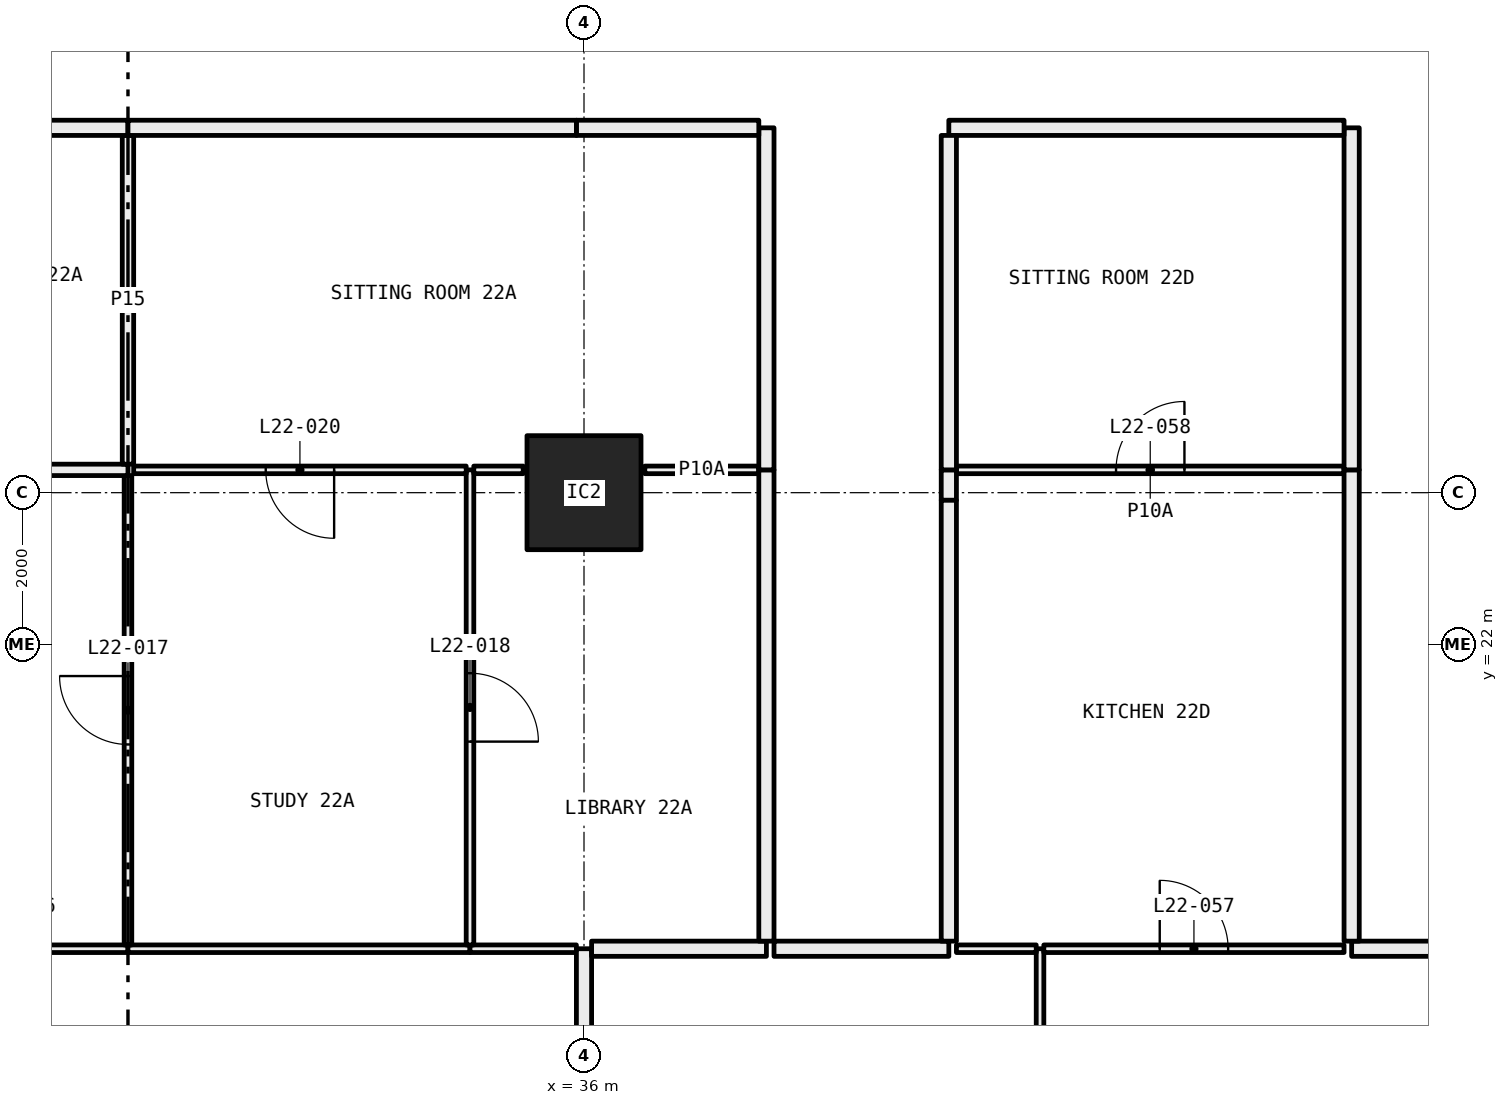
"""IFC4 building model, lengths in metres.
Left out: names, types, materials, properties, quantities, classifications, styles, units other than length and angle.
Written with IfcOpenShell. Run it as: python <this file> out.ifc"""

import sys

from ifc_helpers import new_model, si_unit, direction, frame, frame_2d, origin, origin_2d, place, context, subcontext, project, spatial, rectangle, hollow_rectangle, extrude, element, fill, save


model = new_model("IFC4")
c1 = context("Model", 3, precision=1e-05, world=origin(), true_north=direction((0.0, 1.0)))
c2 = subcontext(c1, "Body", "Model", "MODEL_VIEW")
j1 = project(units=[si_unit("LENGTHUNIT", "METRE"), si_unit("PLANEANGLEUNIT", "RADIAN")], contexts=[c1])
p1 = place(None, origin())
s1 = spatial("IfcSite", under=j1, at=p1, CompositionType="ELEMENT")
p2 = place(p1, origin())
s2 = spatial("IfcBuilding", under=s1, at=p2, CompositionType="ELEMENT")
p3 = place(p2, frame((0.0, 0.0, 88.65)))
s3 = spatial("IfcBuildingStorey", under=s2, at=p3, CompositionType="ELEMENT", Elevation=88.65)
p4 = place(p3, frame((36.0, 24.0, 0.0), z_axis=(0.0, 0.0, 1.0), x_axis=(1.0, 0.0, 0.0)))
e1 = element("IfcColumn", 1, at=p4, inside=s3, PredefinedType="COLUMN", context=c2, shape_type="SweptSolid", body=[
    extrude(hollow_rectangle(XDim=1.5, YDim=1.5, WallThickness=0.065, at=origin_2d()), origin(), (0.0, 0.0, 1.0), 3.05),
])
p5 = place(p3, frame((30.0, 18.0, 0.0), z_axis=(0.0, 0.0, 1.0), x_axis=(-1.0, 0.0, 0.0)))
e2 = element("IfcWall", 2, at=p5, inside=s3, PredefinedType="PARTITIONING", context=c2, shape_type="SweptSolid", body=[
    extrude(rectangle(XDim=2.95, YDim=0.1, at=frame_2d((1.475, 0.0))), origin(), (0.0, 0.0, 1.0), 3.05),
])
p6 = place(p5, frame((1.025, 0.0, 0.0)))
e3 = element("IfcOpeningElement", 3, at=p6, cuts=e2, PredefinedType="OPENING", context=c2, shape_type="SweptSolid", body=[
    extrude(rectangle(XDim=0.9, YDim=2.1, at=frame_2d((0.45, 1.05))), frame((0.0, 0.06, 0.0), z_axis=(0.0, -1.0, 0.0), x_axis=(1.0, 0.0, 0.0)), (0.0, 0.0, 1.0), 0.12),
])
p7 = place(p3, frame((34.5, 18.0, 0.0), z_axis=(0.0, 0.0, 1.0), x_axis=(-1.0, 0.0, 0.0)))
e4 = element("IfcWall", 4, at=p7, inside=s3, PredefinedType="PARTITIONING", context=c2, shape_type="SweptSolid", body=[
    extrude(rectangle(XDim=4.5, YDim=0.1, at=frame_2d((2.25, 0.0))), origin(), (0.0, 0.0, 1.0), 3.05),
])
p8 = place(p3, frame((35.9, 18.0, 0.0), z_axis=(0.0, 0.0, 1.0), x_axis=(-1.0, 0.0, 0.0)))
e5 = element("IfcWall", 5, at=p8, inside=s3, PredefinedType="PARTITIONING", context=c2, shape_type="SweptSolid", body=[
    extrude(rectangle(XDim=1.4, YDim=0.1, at=frame_2d((0.7, 0.0))), origin(), (0.0, 0.0, 1.0), 3.05),
])
p9 = place(p3, frame((36.0, 12.8, 0.0), z_axis=(0.0, 0.0, 1.0), x_axis=(0.0, 1.0, 0.0)))
e6 = element("IfcWall", 6, at=p9, inside=s3, PredefinedType="PARTITIONING", context=c2, shape_type="SweptSolid", body=[
    extrude(rectangle(XDim=5.2, YDim=0.2, at=frame_2d((2.6, 0.0))), origin(), (0.0, 0.0, 1.0), 2.45),
])
p10 = place(p3, frame((30.0, 18.05, 0.0), z_axis=(0.0, 0.0, 1.0), x_axis=(0.0, 1.0, 0.0)))
e7 = element("IfcWall", 7, at=p10, inside=s3, PredefinedType="PARTITIONING", context=c2, shape_type="SweptSolid", body=[
    extrude(rectangle(XDim=6.175, YDim=0.1, at=frame_2d((3.087, 0.0))), origin(), (0.0, 0.0, 1.0), 2.45),
])
p11 = place(p10, frame((2.637, 0.0, 0.0)))
e8 = element("IfcOpeningElement", 8, at=p11, cuts=e7, PredefinedType="OPENING", context=c2, shape_type="SweptSolid", body=[
    extrude(rectangle(XDim=0.9, YDim=2.1, at=frame_2d((0.45, 1.05))), frame((0.0, 0.06, 0.0), z_axis=(0.0, -1.0, 0.0), x_axis=(1.0, 0.0, 0.0)), (0.0, 0.0, 1.0), 0.12),
])
p12 = place(p3, frame((30.0, 24.3, 0.0), z_axis=(0.0, 0.0, 1.0), x_axis=(-1.0, 0.0, 0.0)))
e9 = element("IfcWall", 9, at=p12, inside=s3, PredefinedType="PARTITIONING", context=c2, shape_type="SweptSolid", body=[
    extrude(rectangle(XDim=4.0, YDim=0.15, at=frame_2d((2.0, 0.0))), origin(), (0.0, 0.0, 1.0), 3.05),
])
p13 = place(p12, frame((1.55, 0.0, 0.0)))
e10 = element("IfcOpeningElement", 10, at=p13, cuts=e9, PredefinedType="OPENING", context=c2, shape_type="SweptSolid", body=[
    extrude(rectangle(XDim=0.9, YDim=2.1, at=frame_2d((0.45, 1.05))), frame((0.0, 0.085, 0.0), z_axis=(0.0, -1.0, 0.0), x_axis=(1.0, 0.0, 0.0)), (0.0, 0.0, 1.0), 0.17),
])
p14 = place(p3, frame((34.5, 18.05, 0.0), z_axis=(0.0, 0.0, 1.0), x_axis=(0.0, 1.0, 0.0)))
e11 = element("IfcWall", 11, at=p14, inside=s3, PredefinedType="PARTITIONING", context=c2, shape_type="SweptSolid", body=[
    extrude(rectangle(XDim=6.25, YDim=0.1, at=frame_2d((3.125, 0.0))), origin(), (0.0, 0.0, 1.0), 2.45),
])
p15 = place(p14, frame((2.675, 0.0, 0.0)))
e12 = element("IfcOpeningElement", 12, at=p15, cuts=e11, PredefinedType="OPENING", context=c2, shape_type="SweptSolid", body=[
    extrude(rectangle(XDim=0.9, YDim=2.1, at=frame_2d((0.45, 1.05))), frame((0.0, 0.06, 0.0), z_axis=(0.0, -1.0, 0.0), x_axis=(1.0, 0.0, 0.0)), (0.0, 0.0, 1.0), 0.12),
])
p16 = place(p3, frame((34.45, 24.3, 0.0), z_axis=(0.0, 0.0, 1.0), x_axis=(-1.0, 0.0, 0.0)))
e13 = element("IfcWall", 13, at=p16, inside=s3, PredefinedType="PARTITIONING", context=c2, shape_type="SweptSolid", body=[
    extrude(rectangle(XDim=4.375, YDim=0.1, at=frame_2d((2.188, 0.0))), origin(), (0.0, 0.0, 1.0), 3.05),
])
p17 = place(p16, frame((1.738, 0.0, 0.0)))
e14 = element("IfcOpeningElement", 14, at=p17, cuts=e13, PredefinedType="OPENING", context=c2, shape_type="SweptSolid", body=[
    extrude(rectangle(XDim=0.9, YDim=2.1, at=frame_2d((0.45, 1.05))), frame((0.0, 0.06, 0.0), z_axis=(0.0, -1.0, 0.0), x_axis=(1.0, 0.0, 0.0)), (0.0, 0.0, 1.0), 0.12),
])
p18 = place(p3, frame((35.2, 24.3, 0.0), z_axis=(0.0, 0.0, 1.0), x_axis=(-1.0, 0.0, 0.0)))
e15 = element("IfcWall", 15, at=p18, inside=s3, PredefinedType="PARTITIONING", context=c2, shape_type="SweptSolid", body=[
    extrude(rectangle(XDim=0.65, YDim=0.1, at=frame_2d((0.325, 0.0))), origin(), (0.0, 0.0, 1.0), 3.05),
])
p19 = place(p3, frame((38.3, 24.3, 0.0), z_axis=(0.0, 0.0, 1.0), x_axis=(-1.0, 0.0, 0.0)))
e16 = element("IfcWall", 16, at=p19, inside=s3, PredefinedType="PARTITIONING", context=c2, shape_type="SweptSolid", body=[
    extrude(rectangle(XDim=1.5, YDim=0.1, at=frame_2d((0.75, 0.0))), origin(), (0.0, 0.0, 1.0), 3.05),
])
p20 = place(p3, frame((36.1, 18.0, 0.0), z_axis=(0.0, 0.0, 1.0), x_axis=(1.0, 0.0, 0.0)))
e17 = element("IfcWall", 17, at=p20, inside=s3, PredefinedType="PARTITIONING", context=c2, shape_type="SweptSolid", body=[
    extrude(rectangle(XDim=2.3, YDim=0.2, at=frame_2d((1.15, 0.0))), origin(), (0.0, 0.0, 1.0), 3.05),
])
p21 = place(p3, frame((38.4, 18.1, 0.0), z_axis=(0.0, 0.0, 1.0), x_axis=(0.0, 1.0, 0.0)))
e18 = element("IfcWall", 18, at=p21, inside=s3, PredefinedType="PARTITIONING", context=c2, shape_type="SweptSolid", body=[
    extrude(rectangle(XDim=6.2, YDim=0.2, at=frame_2d((3.1, 0.0))), origin(), (0.0, 0.0, 1.0), 2.45),
])
p22 = place(p3, frame((30.0, 24.375, 0.0), z_axis=(0.0, 0.0, 1.0), x_axis=(0.0, 1.0, 0.0)))
e19 = element("IfcWall", 19, at=p22, inside=s3, PredefinedType="PARTITIONING", context=c2, shape_type="SweptSolid", body=[
    extrude(rectangle(XDim=4.325, YDim=0.15, at=frame_2d((2.163, 0.0))), origin(), (0.0, 0.0, 1.0), 3.05),
])
p23 = place(p3, frame((30.0, 28.8, 0.0), z_axis=(0.0, 0.0, 1.0), x_axis=(-1.0, 0.0, 0.0)))
e20 = element("IfcWall", 20, at=p23, inside=s3, PredefinedType="PARTITIONING", context=c2, shape_type="SweptSolid", body=[
    extrude(rectangle(XDim=4.1, YDim=0.2, at=frame_2d((2.05, 0.0))), origin(), (0.0, 0.0, 1.0), 3.05),
])
p24 = place(p3, frame((38.4, 24.3, 0.0), z_axis=(0.0, 0.0, 1.0), x_axis=(0.0, 1.0, 0.0)))
e21 = element("IfcWall", 21, at=p24, inside=s3, PredefinedType="PARTITIONING", context=c2, shape_type="SweptSolid", body=[
    extrude(rectangle(XDim=4.5, YDim=0.2, at=frame_2d((2.25, 0.0))), origin(), (0.0, 0.0, 1.0), 3.05),
])
p25 = place(p3, frame((38.3, 28.8, 0.0), z_axis=(0.0, 0.0, 1.0), x_axis=(-1.0, 0.0, 0.0)))
e22 = element("IfcWall", 22, at=p25, inside=s3, PredefinedType="PARTITIONING", context=c2, shape_type="SweptSolid", body=[
    extrude(rectangle(XDim=2.4, YDim=0.2, at=frame_2d((1.2, 0.0))), origin(), (0.0, 0.0, 1.0), 2.45),
])
p26 = place(p3, frame((35.9, 28.8, 0.0), z_axis=(0.0, 0.0, 1.0), x_axis=(-1.0, 0.0, 0.0)))
e23 = element("IfcWall", 23, at=p26, inside=s3, PredefinedType="PARTITIONING", context=c2, shape_type="SweptSolid", body=[
    extrude(rectangle(XDim=5.9, YDim=0.2, at=frame_2d((2.95, 0.0))), origin(), (0.0, 0.0, 1.0), 3.05),
])
p27 = place(p3, frame((42.0, 12.05, 0.0), z_axis=(0.0, 0.0, 1.0), x_axis=(0.0, 1.0, 0.0)))
e24 = element("IfcWall", 24, at=p27, inside=s3, PredefinedType="PARTITIONING", context=c2, shape_type="SweptSolid", body=[
    extrude(rectangle(XDim=5.95, YDim=0.1, at=frame_2d((2.975, 0.0))), origin(), (0.0, 0.0, 1.0), 2.45),
])
p28 = place(p3, frame((41.95, 18.0, 0.0), z_axis=(0.0, 0.0, 1.0), x_axis=(-1.0, 0.0, 0.0)))
e25 = element("IfcWall", 25, at=p28, inside=s3, PredefinedType="PARTITIONING", context=c2, shape_type="SweptSolid", body=[
    extrude(rectangle(XDim=1.05, YDim=0.1, at=frame_2d((0.525, 0.0))), origin(), (0.0, 0.0, 1.0), 3.05),
])
p29 = place(p3, frame((40.8, 18.0, 0.0), z_axis=(0.0, 0.0, 1.0), x_axis=(-1.0, 0.0, 0.0)))
e26 = element("IfcWall", 26, at=p29, inside=s3, PredefinedType="PARTITIONING", context=c2, shape_type="SweptSolid", body=[
    extrude(rectangle(XDim=2.3, YDim=0.2, at=frame_2d((1.15, 0.0))), origin(), (0.0, 0.0, 1.0), 3.05),
])
p30 = place(p3, frame((46.0, 18.0, 0.0), z_axis=(0.0, 0.0, 1.0), x_axis=(-1.0, 0.0, 0.0)))
e27 = element("IfcWall", 27, at=p30, inside=s3, PredefinedType="PARTITIONING", context=c2, shape_type="SweptSolid", body=[
    extrude(rectangle(XDim=3.95, YDim=0.1, at=frame_2d((1.975, 0.0))), origin(), (0.0, 0.0, 1.0), 3.05),
])
p31 = place(p30, frame((1.525, 0.0, 0.0)))
e28 = element("IfcOpeningElement", 28, at=p31, cuts=e27, PredefinedType="OPENING", context=c2, shape_type="SweptSolid", body=[
    extrude(rectangle(XDim=0.9, YDim=2.1, at=frame_2d((0.45, 1.05))), frame((0.0, 0.06, 0.0), z_axis=(0.0, -1.0, 0.0), x_axis=(1.0, 0.0, 0.0)), (0.0, 0.0, 1.0), 0.12),
])
p32 = place(p3, frame((49.5, 18.0, 0.0), z_axis=(0.0, 0.0, 1.0), x_axis=(-1.0, 0.0, 0.0)))
e29 = element("IfcWall", 29, at=p32, inside=s3, PredefinedType="PARTITIONING", context=c2, shape_type="SweptSolid", body=[
    extrude(rectangle(XDim=3.4, YDim=0.2, at=frame_2d((1.7, 0.0))), origin(), (0.0, 0.0, 1.0), 3.05),
])
p33 = place(p3, frame((46.0, 24.3, 0.0), z_axis=(0.0, 0.0, 1.0), x_axis=(-1.0, 0.0, 0.0)))
e30 = element("IfcWall", 30, at=p33, inside=s3, PredefinedType="PARTITIONING", context=c2, shape_type="SweptSolid", body=[
    extrude(rectangle(XDim=5.1, YDim=0.1, at=frame_2d((2.55, 0.0))), origin(), (0.0, 0.0, 1.0), 3.05),
])
p34 = place(p33, frame((2.1, 0.0, 0.0)))
e31 = element("IfcOpeningElement", 31, at=p34, cuts=e30, PredefinedType="OPENING", context=c2, shape_type="SweptSolid", body=[
    extrude(rectangle(XDim=0.9, YDim=2.1, at=frame_2d((0.45, 1.05))), frame((0.0, 0.06, 0.0), z_axis=(0.0, -1.0, 0.0), x_axis=(1.0, 0.0, 0.0)), (0.0, 0.0, 1.0), 0.12),
])
p35 = place(p3, frame((40.8, 24.3, 0.0), z_axis=(0.0, 0.0, 1.0), x_axis=(0.0, -1.0, 0.0)))
e32 = element("IfcWall", 32, at=p35, inside=s3, PredefinedType="PARTITIONING", context=c2, shape_type="SweptSolid", body=[
    extrude(rectangle(XDim=0.4, YDim=0.2, at=frame_2d((0.2, 0.0))), origin(), (0.0, 0.0, 1.0), 2.45),
])
p36 = place(p3, frame((40.8, 23.9, 0.0), z_axis=(0.0, 0.0, 1.0), x_axis=(0.0, -1.0, 0.0)))
e33 = element("IfcWall", 33, at=p36, inside=s3, PredefinedType="PARTITIONING", context=c2, shape_type="SweptSolid", body=[
    extrude(rectangle(XDim=5.8, YDim=0.2, at=frame_2d((2.9, 0.0))), origin(), (0.0, 0.0, 1.0), 3.05),
])
p37 = place(p3, frame((46.1, 18.1, 0.0), z_axis=(0.0, 0.0, 1.0), x_axis=(0.0, 1.0, 0.0)))
e34 = element("IfcWall", 34, at=p37, inside=s3, PredefinedType="PARTITIONING", context=c2, shape_type="SweptSolid", body=[
    extrude(rectangle(XDim=6.2, YDim=0.2, at=frame_2d((3.1, 0.0))), origin(), (0.0, 0.0, 1.0), 2.45),
])
p38 = place(p3, frame((46.1, 24.3, 0.0), z_axis=(0.0, 0.0, 1.0), x_axis=(0.0, 1.0, 0.0)))
e35 = element("IfcWall", 35, at=p38, inside=s3, PredefinedType="PARTITIONING", context=c2, shape_type="SweptSolid", body=[
    extrude(rectangle(XDim=4.5, YDim=0.2, at=frame_2d((2.25, 0.0))), origin(), (0.0, 0.0, 1.0), 3.05),
])
p39 = place(p3, frame((46.0, 28.8, 0.0), z_axis=(0.0, 0.0, 1.0), x_axis=(-1.0, 0.0, 0.0)))
e36 = element("IfcWall", 36, at=p39, inside=s3, PredefinedType="PARTITIONING", context=c2, shape_type="SweptSolid", body=[
    extrude(rectangle(XDim=5.2, YDim=0.2, at=frame_2d((2.6, 0.0))), origin(), (0.0, 0.0, 1.0), 3.05),
])
p40 = place(p3, frame((40.8, 28.7, 0.0), z_axis=(0.0, 0.0, 1.0), x_axis=(0.0, -1.0, 0.0)))
e37 = element("IfcWall", 37, at=p40, inside=s3, PredefinedType="PARTITIONING", context=c2, shape_type="SweptSolid", body=[
    extrude(rectangle(XDim=4.4, YDim=0.2, at=frame_2d((2.2, 0.0))), origin(), (0.0, 0.0, 1.0), 3.05),
])
p41 = place(p11, origin())
e38 = element("IfcDoor", 38, at=p41, inside=s3, OperationType="SINGLE_SWING_LEFT", PredefinedType="DOOR", context=c2, shape_type="SweptSolid", body=[
    extrude(rectangle(XDim=0.9, YDim=2.1, at=frame_2d((0.45, 1.05))), frame((0.0, 0.025, 0.0), z_axis=(0.0, -1.0, 0.0), x_axis=(1.0, 0.0, 0.0)), (0.0, 0.0, 1.0), 0.05),
])
fill(e8, e38)
p42 = place(p15, frame((0.9, 0.0, 0.0), x_axis=(-1.0, 0.0, 0.0)))
e39 = element("IfcDoor", 39, at=p42, inside=s3, OperationType="SINGLE_SWING_LEFT", PredefinedType="DOOR", context=c2, shape_type="SweptSolid", body=[
    extrude(rectangle(XDim=0.9, YDim=2.1, at=frame_2d((0.45, 1.05))), frame((0.0, 0.025, 0.0), z_axis=(0.0, -1.0, 0.0), x_axis=(1.0, 0.0, 0.0)), (0.0, 0.0, 1.0), 0.05),
])
fill(e12, e39)
p43 = place(p17, origin())
e40 = element("IfcDoor", 40, at=p43, inside=s3, OperationType="SINGLE_SWING_RIGHT", PredefinedType="DOOR", context=c2, shape_type="SweptSolid", body=[
    extrude(rectangle(XDim=0.9, YDim=2.1, at=frame_2d((0.45, 1.05))), frame((0.0, 0.025, 0.0), z_axis=(0.0, -1.0, 0.0), x_axis=(1.0, 0.0, 0.0)), (0.0, 0.0, 1.0), 0.05),
])
fill(e14, e40)
p44 = place(p31, frame((0.9, 0.0, 0.0), x_axis=(-1.0, 0.0, 0.0)))
e41 = element("IfcDoor", 41, at=p44, inside=s3, OperationType="SINGLE_SWING_RIGHT", PredefinedType="DOOR", context=c2, shape_type="SweptSolid", body=[
    extrude(rectangle(XDim=0.9, YDim=2.1, at=frame_2d((0.45, 1.05))), frame((0.0, 0.025, 0.0), z_axis=(0.0, -1.0, 0.0), x_axis=(1.0, 0.0, 0.0)), (0.0, 0.0, 1.0), 0.05),
])
fill(e28, e41)
p45 = place(p34, frame((0.9, 0.0, 0.0), x_axis=(-1.0, 0.0, 0.0)))
e42 = element("IfcDoor", 42, at=p45, inside=s3, OperationType="SINGLE_SWING_LEFT", PredefinedType="DOOR", context=c2, shape_type="SweptSolid", body=[
    extrude(rectangle(XDim=0.9, YDim=2.1, at=frame_2d((0.45, 1.05))), frame((0.0, 0.025, 0.0), z_axis=(0.0, -1.0, 0.0), x_axis=(1.0, 0.0, 0.0)), (0.0, 0.0, 1.0), 0.05),
])
fill(e31, e42)
save(model, sys.argv[1])
